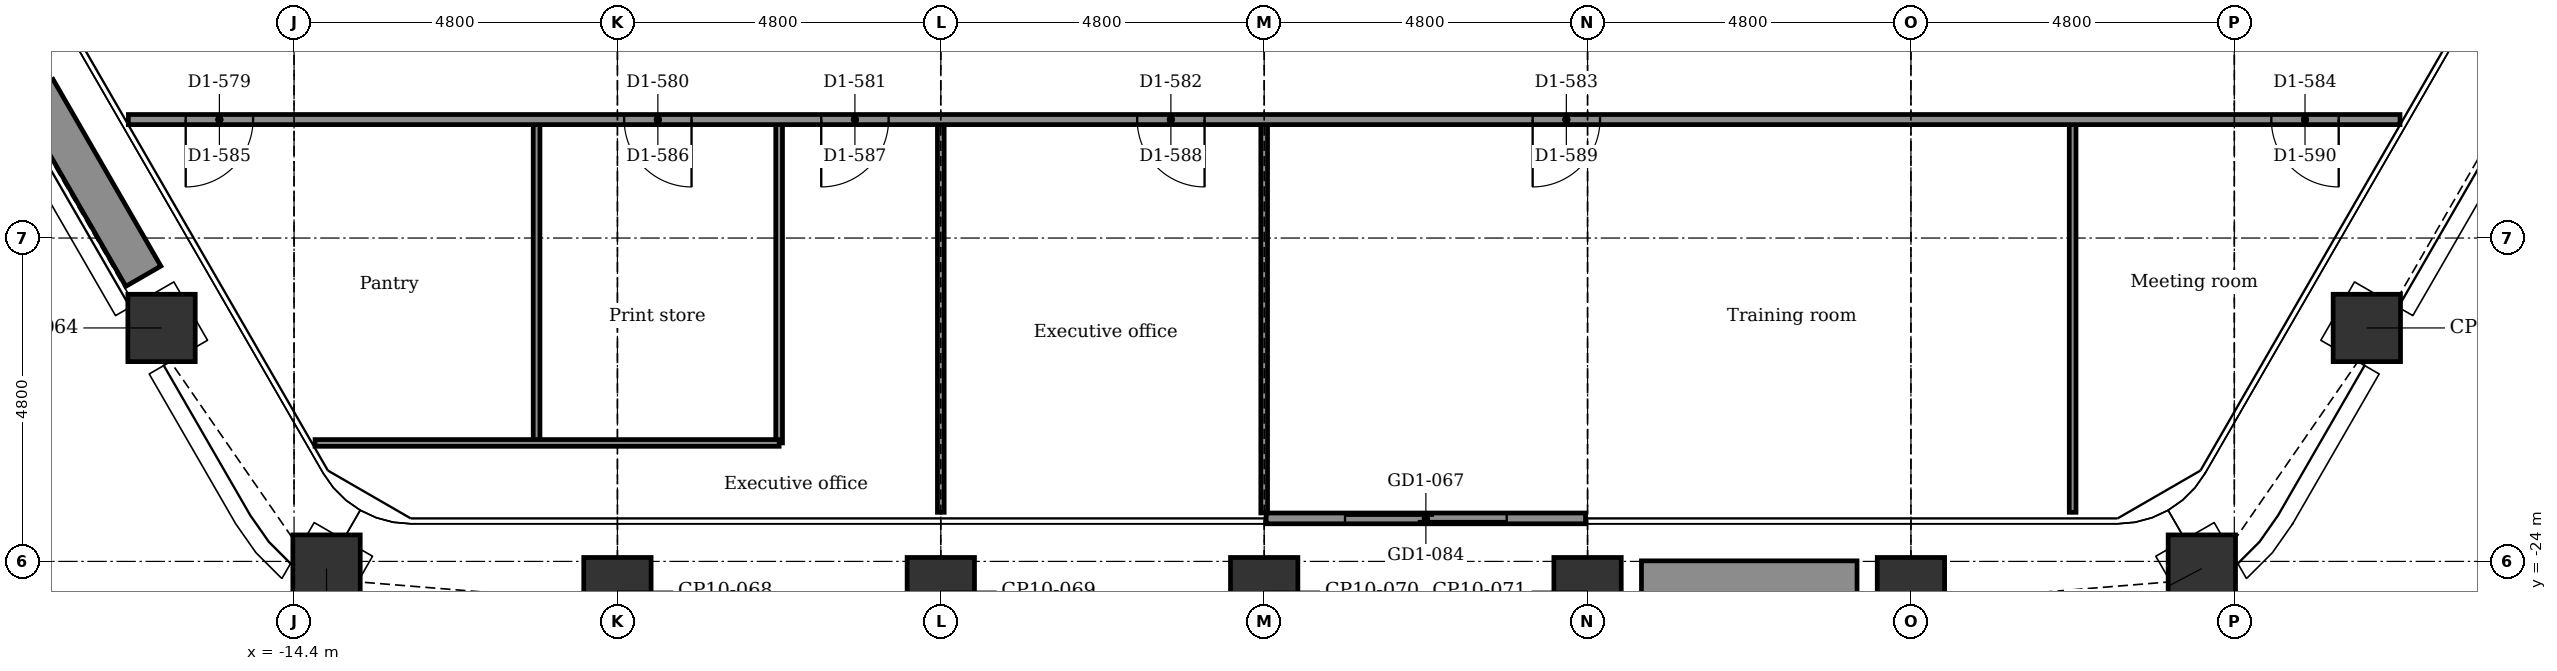
"""IFC4 building model, lengths in metres.
Left out: names, types, materials, properties, quantities, classifications, styles, units other than length and angle.
Written with IfcOpenShell. Run it as: python <this file> out.ifc"""

import sys

from ifc_helpers import new_model, si_unit, direction, frame, frame_2d, origin, origin_2d, place, context, subcontext, project, spatial, rectangle, extrude, element, fill, save


model = new_model("IFC4")
c1 = context("Model", 3, precision=1e-05, world=origin(), true_north=direction((0.0, 1.0)))
c2 = subcontext(c1, "Body", "Model", "MODEL_VIEW")
j1 = project(units=[si_unit("LENGTHUNIT", "METRE"), si_unit("PLANEANGLEUNIT", "RADIAN")], contexts=[c1])
p1 = place(None, origin())
s1 = spatial("IfcSite", under=j1, at=p1, CompositionType="ELEMENT")
p2 = place(p1, origin())
s2 = spatial("IfcBuilding", under=s1, at=p2, CompositionType="ELEMENT")
p3 = place(p2, frame((0.0, 0.0, 201.2)))
s3 = spatial("IfcBuildingStorey", under=s2, at=p3, CompositionType="ELEMENT", Elevation=201.2)
for number, where, z_axis, x_axis in (
    (1, (16.367, -20.535, -0.15), (0.0, 0.0, 1.0), (0.5, 0.866, 0.0)),
    (2, (13.918, -24.107, -0.15), (0.0, 0.0, 1.0), (0.866, 0.5, 0.0)),
    (3, (9.6, -24.442, -0.15), (0.0, 0.0, 1.0), (1.0, 0.0, 0.0)),
    (4, (4.8, -24.442, -0.15), (0.0, 0.0, 1.0), (1.0, 0.0, 0.0)),
    (5, (0.0, -24.442, -0.15), (0.0, 0.0, 1.0), (1.0, 0.0, 0.0)),
    (6, (-4.8, -24.442, -0.15), (0.0, 0.0, 1.0), (1.0, 0.0, 0.0)),
    (7, (-9.6, -24.442, -0.15), (0.0, 0.0, 1.0), (1.0, 0.0, 0.0)),
    (8, (-13.918, -24.107, -0.15), (0.0, 0.0, 1.0), (0.5, 0.866, 0.0)),
    (9, (-16.367, -20.535, -0.15), (0.0, 0.0, 1.0), (0.866, 0.5, 0.0)),
):
    element("IfcColumn", number, at=place(p3, frame(where, z_axis=z_axis, x_axis=x_axis)), inside=s3, PredefinedType="COLUMN", context=c2, shape_type="SweptSolid", body=[
        extrude(rectangle(XDim=1.0, YDim=1.0, at=origin_2d()), origin(), (0.0, 0.0, 1.0), 3.9),
    ])
p4 = place(p3, frame((4.77, -23.362, 0.0), z_axis=(0.0, 0.0, 1.0), x_axis=(-1.0, 0.0, 0.0)))
e10 = element("IfcWall", 10, at=p4, inside=s3, PredefinedType="PARTITIONING", context=c2, shape_type="SweptSolid", body=[
    extrude(rectangle(XDim=4.74, YDim=0.16, at=frame_2d((2.37, 0.0))), origin(), (0.0, 0.0, 1.0), 3.75),
])
p5 = place(p4, frame((1.17, 0.0, 0.0)))
e11 = element("IfcOpeningElement", 11, at=p5, cuts=e10, PredefinedType="OPENING", context=c2, shape_type="SweptSolid", body=[
    extrude(rectangle(XDim=2.4, YDim=2.4, at=frame_2d((1.2, 1.2))), frame((0.0, 0.09, 0.0), z_axis=(0.0, -1.0, 0.0), x_axis=(1.0, 0.0, 0.0)), (0.0, 0.0, 1.0), 0.18),
])
for number, where, z_axis, x_axis in (
    (12, (8.8, -24.292, 0.0), (0.0, 0.0, 1.0), (-1.0, 0.0, 0.0)),
    (13, (-16.637, -19.767, 0.0), (0.0, 0.0, 1.0), (-0.5, 0.866, 0.0)),
):
    element("IfcWall", number, at=place(p3, frame(where, z_axis=z_axis, x_axis=x_axis)), inside=s3, PredefinedType="USERDEFINED", context=c2, shape_type="SweptSolid", body=[
        extrude(rectangle(XDim=3.2, YDim=0.6, at=frame_2d((1.6, 0.0))), origin(), (0.0, 0.0, 1.0), 0.7),
    ])
p6 = place(p3, frame((12.0, -23.271, 0.0), z_axis=(0.0, 0.0, 1.0), x_axis=(0.0, 1.0, 0.0)))
e14 = element("IfcWall", 14, at=p6, inside=s3, PredefinedType="PARTITIONING", context=c2, shape_type="SweptSolid", body=[
    extrude(rectangle(XDim=5.83, YDim=0.1, at=frame_2d((2.915, 0.0))), origin(), (0.0, 0.0, 1.0), 3.75),
])
p7 = place(p3, frame((0.0, -23.281, 0.0), z_axis=(0.0, 0.0, 1.0), x_axis=(0.0, 1.0, 0.0)))
e15 = element("IfcWall", 15, at=p7, inside=s3, PredefinedType="PARTITIONING", context=c2, shape_type="SweptSolid", body=[
    extrude(rectangle(XDim=5.84, YDim=0.1, at=frame_2d((2.92, 0.0))), origin(), (0.0, 0.0, 1.0), 3.066),
])
p8 = place(p3, frame((-4.8, -23.271, 0.0), z_axis=(0.0, 0.0, 1.0), x_axis=(0.0, 1.0, 0.0)))
e16 = element("IfcWall", 16, at=p8, inside=s3, PredefinedType="PARTITIONING", context=c2, shape_type="SweptSolid", body=[
    extrude(rectangle(XDim=5.83, YDim=0.1, at=frame_2d((2.915, 0.0))), origin(), (0.0, 0.0, 1.0), 3.066),
])
for number, where, z_axis, x_axis in (
    (17, (-7.2, -22.241, 0.0), (0.0, 0.0, 1.0), (0.0, 1.0, 0.0)),
    (18, (-10.8, -22.241, 0.0), (0.0, 0.0, 1.0), (0.0, 1.0, 0.0)),
):
    element("IfcWall", number, at=place(p3, frame(where, z_axis=z_axis, x_axis=x_axis)), inside=s3, PredefinedType="PARTITIONING", context=c2, shape_type="SweptSolid", body=[
        extrude(rectangle(XDim=4.8, YDim=0.1, at=frame_2d((2.4, 0.0))), origin(), (0.0, 0.0, 1.0), 3.75),
    ])
p9 = place(p3, frame((-14.088, -22.241, 0.0), z_axis=(0.0, 0.0, 1.0), x_axis=(1.0, 0.0, 0.0)))
e19 = element("IfcWall", 19, at=p9, inside=s3, PredefinedType="PARTITIONING", context=c2, shape_type="SweptSolid", body=[
    extrude(rectangle(XDim=6.888, YDim=0.1, at=frame_2d((3.444, 0.0))), origin(), (0.0, 0.0, 1.0), 3.75),
])
p10 = place(p3, frame((-16.86, -17.441, 0.0), z_axis=(0.0, 0.0, 1.0), x_axis=(1.0, 0.0, 0.0)))
e20 = element("IfcWall", 20, at=p10, inside=s3, PredefinedType="PARTITIONING", context=c2, shape_type="SweptSolid", body=[
    extrude(rectangle(XDim=33.719, YDim=0.15, at=frame_2d((16.86, 0.0))), origin(), (0.0, 0.0, 1.0), 3.75),
])
p11 = place(p10, frame((0.851, 0.0, 0.0)))
e21 = element("IfcOpeningElement", 21, at=p11, cuts=e20, PredefinedType="OPENING", context=c2, shape_type="SweptSolid", body=[
    extrude(rectangle(XDim=1.0, YDim=2.1, at=frame_2d((0.5, 1.05))), frame((0.0, 0.085, 0.0), z_axis=(0.0, -1.0, 0.0), x_axis=(1.0, 0.0, 0.0)), (0.0, 0.0, 1.0), 0.17),
])
p12 = place(p10, frame((7.36, 0.0, 0.0)))
e22 = element("IfcOpeningElement", 22, at=p12, cuts=e20, PredefinedType="OPENING", context=c2, shape_type="SweptSolid", body=[
    extrude(rectangle(XDim=1.0, YDim=2.1, at=frame_2d((0.5, 1.05))), frame((0.0, 0.085, 0.0), z_axis=(0.0, -1.0, 0.0), x_axis=(1.0, 0.0, 0.0)), (0.0, 0.0, 1.0), 0.17),
])
p13 = place(p10, frame((10.284, 0.0, 0.0)))
e23 = element("IfcOpeningElement", 23, at=p13, cuts=e20, PredefinedType="OPENING", context=c2, shape_type="SweptSolid", body=[
    extrude(rectangle(XDim=1.0, YDim=2.1, at=frame_2d((0.5, 1.05))), frame((0.0, 0.085, 0.0), z_axis=(0.0, -1.0, 0.0), x_axis=(1.0, 0.0, 0.0)), (0.0, 0.0, 1.0), 0.17),
])
p14 = place(p10, frame((14.975, 0.0, 0.0)))
e24 = element("IfcOpeningElement", 24, at=p14, cuts=e20, PredefinedType="OPENING", context=c2, shape_type="SweptSolid", body=[
    extrude(rectangle(XDim=1.0, YDim=2.1, at=frame_2d((0.5, 1.05))), frame((0.0, 0.085, 0.0), z_axis=(0.0, -1.0, 0.0), x_axis=(1.0, 0.0, 0.0)), (0.0, 0.0, 1.0), 0.17),
])
p15 = place(p10, frame((20.844, 0.0, 0.0)))
e25 = element("IfcOpeningElement", 25, at=p15, cuts=e20, PredefinedType="OPENING", context=c2, shape_type="SweptSolid", body=[
    extrude(rectangle(XDim=1.0, YDim=2.1, at=frame_2d((0.5, 1.05))), frame((0.0, 0.085, 0.0), z_axis=(0.0, -1.0, 0.0), x_axis=(1.0, 0.0, 0.0)), (0.0, 0.0, 1.0), 0.17),
])
p16 = place(p10, frame((31.809, 0.0, 0.0)))
e26 = element("IfcOpeningElement", 26, at=p16, cuts=e20, PredefinedType="OPENING", context=c2, shape_type="SweptSolid", body=[
    extrude(rectangle(XDim=1.0, YDim=2.1, at=frame_2d((0.5, 1.05))), frame((0.0, 0.085, 0.0), z_axis=(0.0, -1.0, 0.0), x_axis=(1.0, 0.0, 0.0)), (0.0, 0.0, 1.0), 0.17),
])
p17 = place(p5, origin())
e27 = element("IfcDoor", 27, at=p17, inside=s3, OperationType="DOUBLE_DOOR_SLIDING", PredefinedType="DOOR", context=c2, shape_type="SweptSolid", body=[
    extrude(rectangle(XDim=2.4, YDim=2.4, at=frame_2d((1.2, 1.2))), frame((0.0, 0.025, 0.0), z_axis=(0.0, -1.0, 0.0), x_axis=(1.0, 0.0, 0.0)), (0.0, 0.0, 1.0), 0.05),
])
fill(e11, e27)
p18 = place(p11, frame((1.0, 0.0, 0.0), z_axis=(0.0, 0.0, 1.0), x_axis=(-1.0, 0.0, 0.0)))
e28 = element("IfcDoor", 28, at=p18, inside=s3, OperationType="SINGLE_SWING_LEFT", PredefinedType="DOOR", context=c2, shape_type="SweptSolid", body=[
    extrude(rectangle(XDim=1.0, YDim=2.1, at=frame_2d((0.5, 1.05))), frame((0.0, 0.025, 0.0), z_axis=(0.0, -1.0, 0.0), x_axis=(1.0, 0.0, 0.0)), (0.0, 0.0, 1.0), 0.05),
])
fill(e21, e28)
p19 = place(p12, frame((1.0, 0.0, 0.0), z_axis=(0.0, 0.0, 1.0), x_axis=(-1.0, 0.0, 0.0)))
e29 = element("IfcDoor", 29, at=p19, inside=s3, OperationType="SINGLE_SWING_RIGHT", PredefinedType="DOOR", context=c2, shape_type="SweptSolid", body=[
    extrude(rectangle(XDim=1.0, YDim=2.1, at=frame_2d((0.5, 1.05))), frame((0.0, 0.025, 0.0), z_axis=(0.0, -1.0, 0.0), x_axis=(1.0, 0.0, 0.0)), (0.0, 0.0, 1.0), 0.05),
])
fill(e22, e29)
p20 = place(p13, frame((1.0, 0.0, 0.0), z_axis=(0.0, 0.0, 1.0), x_axis=(-1.0, 0.0, 0.0)))
e30 = element("IfcDoor", 30, at=p20, inside=s3, OperationType="SINGLE_SWING_LEFT", PredefinedType="DOOR", context=c2, shape_type="SweptSolid", body=[
    extrude(rectangle(XDim=1.0, YDim=2.1, at=frame_2d((0.5, 1.05))), frame((0.0, 0.025, 0.0), z_axis=(0.0, -1.0, 0.0), x_axis=(1.0, 0.0, 0.0)), (0.0, 0.0, 1.0), 0.05),
])
fill(e23, e30)
p21 = place(p14, frame((1.0, 0.0, 0.0), z_axis=(0.0, 0.0, 1.0), x_axis=(-1.0, 0.0, 0.0)))
e31 = element("IfcDoor", 31, at=p21, inside=s3, OperationType="SINGLE_SWING_RIGHT", PredefinedType="DOOR", context=c2, shape_type="SweptSolid", body=[
    extrude(rectangle(XDim=1.0, YDim=2.1, at=frame_2d((0.5, 1.05))), frame((0.0, 0.025, 0.0), z_axis=(0.0, -1.0, 0.0), x_axis=(1.0, 0.0, 0.0)), (0.0, 0.0, 1.0), 0.05),
])
fill(e24, e31)
p22 = place(p15, frame((1.0, 0.0, 0.0), z_axis=(0.0, 0.0, 1.0), x_axis=(-1.0, 0.0, 0.0)))
e32 = element("IfcDoor", 32, at=p22, inside=s3, OperationType="SINGLE_SWING_LEFT", PredefinedType="DOOR", context=c2, shape_type="SweptSolid", body=[
    extrude(rectangle(XDim=1.0, YDim=2.1, at=frame_2d((0.5, 1.05))), frame((0.0, 0.025, 0.0), z_axis=(0.0, -1.0, 0.0), x_axis=(1.0, 0.0, 0.0)), (0.0, 0.0, 1.0), 0.05),
])
fill(e25, e32)
p23 = place(p16, frame((1.0, 0.0, 0.0), z_axis=(0.0, 0.0, 1.0), x_axis=(-1.0, 0.0, 0.0)))
e33 = element("IfcDoor", 33, at=p23, inside=s3, OperationType="SINGLE_SWING_RIGHT", PredefinedType="DOOR", context=c2, shape_type="SweptSolid", body=[
    extrude(rectangle(XDim=1.0, YDim=2.1, at=frame_2d((0.5, 1.05))), frame((0.0, 0.025, 0.0), z_axis=(0.0, -1.0, 0.0), x_axis=(1.0, 0.0, 0.0)), (0.0, 0.0, 1.0), 0.05),
])
fill(e26, e33)
save(model, sys.argv[1])
